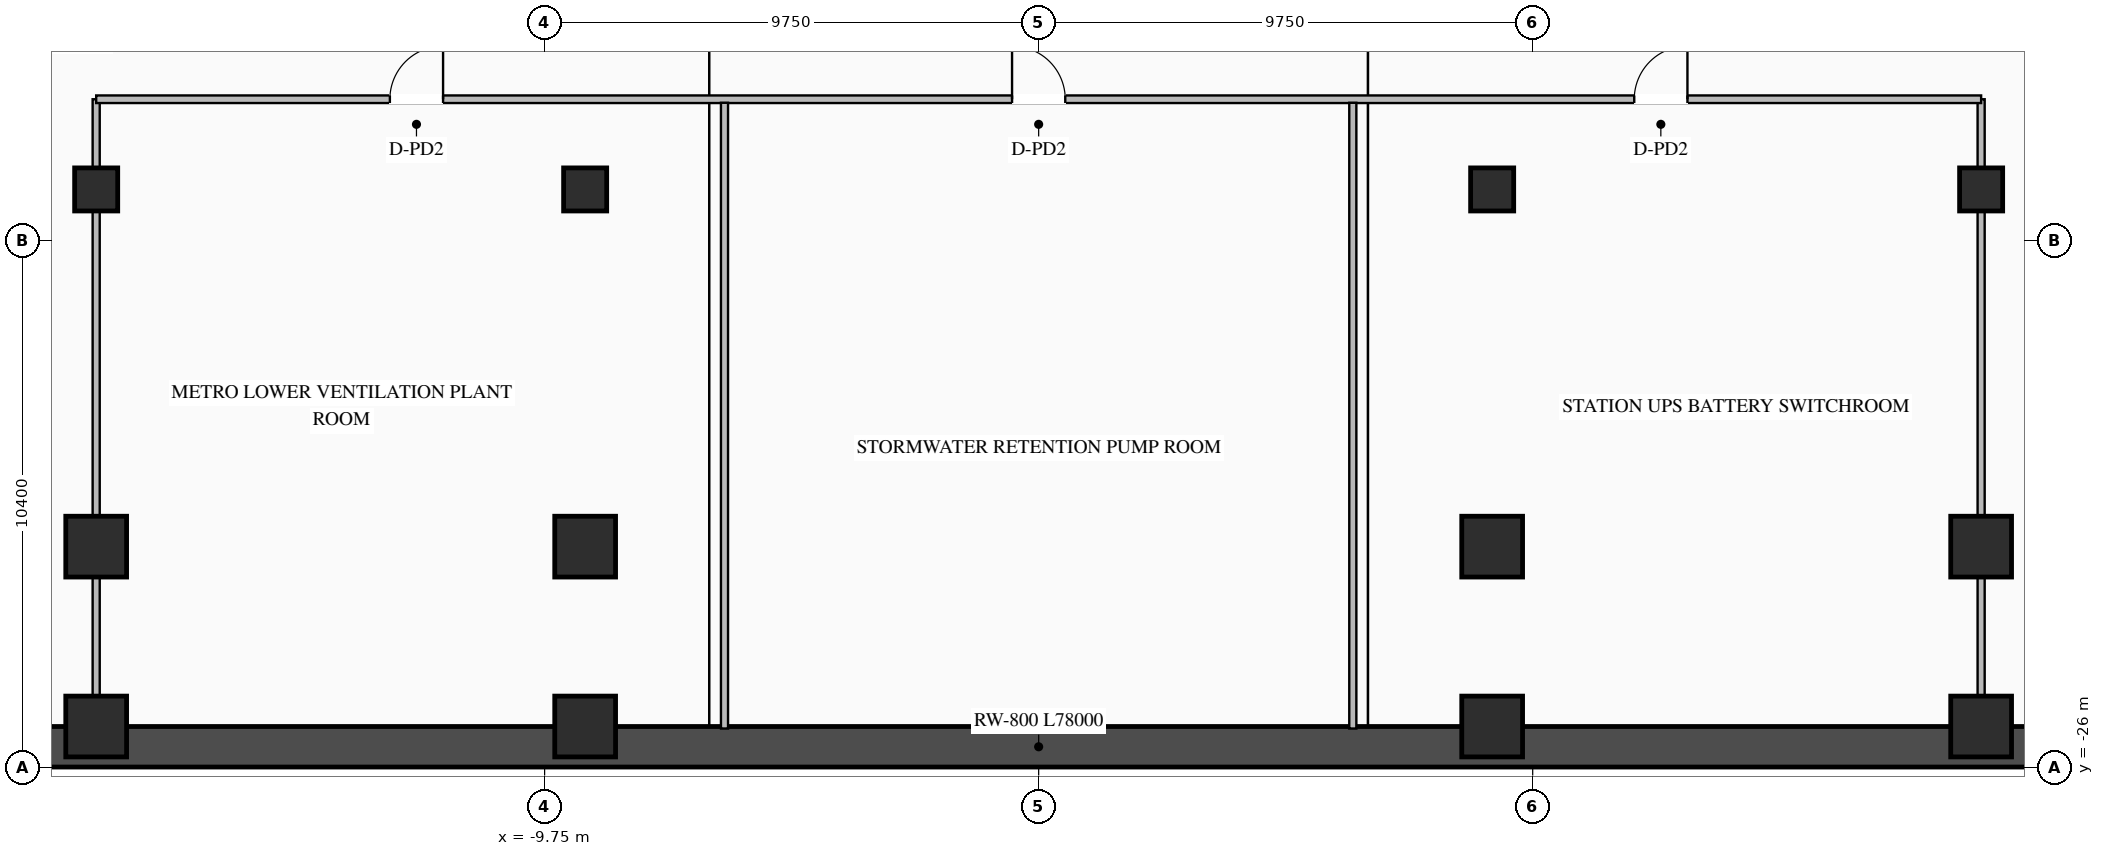
"""IFC4 building model, lengths in metres.
Left out: names, types, materials, properties, quantities, classifications, styles, units other than length and angle.
Written with IfcOpenShell. Run it as: python <this file> out.ifc"""

import sys

from ifc_helpers import new_model, si_unit, direction, frame, frame_2d, origin, origin_2d, place, context, subcontext, project, spatial, rectangle, i_section, extrude, element, fill, save


model = new_model("IFC4")
c1 = context("Model", 3, precision=1e-05, world=origin(), true_north=direction((0.0, 1.0)))
c2 = subcontext(c1, "Body", "Model", "MODEL_VIEW")
j1 = project(units=[si_unit("LENGTHUNIT", "METRE"), si_unit("PLANEANGLEUNIT", "RADIAN")], contexts=[c1])
p1 = place(None, origin())
s1 = spatial("IfcSite", under=j1, at=p1, CompositionType="ELEMENT")
p2 = place(p1, origin())
s2 = spatial("IfcBuilding", under=s1, at=p2, CompositionType="ELEMENT")
p3 = place(p2, frame((0.0, 0.0, -9.6)))
s3 = spatial("IfcBuildingStorey", under=s2, at=p3, CompositionType="ELEMENT", Elevation=-9.6)
p4 = place(p3, frame((-39.0, -25.6, 0.0), z_axis=(0.0, 0.0, 1.0), x_axis=(1.0, 0.0, 0.0)))
e1 = element("IfcWall", 1, at=p4, inside=s3, PredefinedType="SOLIDWALL", context=c2, shape_type="SweptSolid", body=[
    extrude(rectangle(XDim=78.0, YDim=0.8, at=frame_2d((39.0, 0.0))), origin(), (0.0, 0.0, 1.0), 4.5),
])
for number, where, z_axis, x_axis in (
    (2, (-18.6, -14.6, 0.0), (0.0, 0.0, 1.0), (1.0, 0.0, 0.0)),
    (3, (-8.95, -14.6, 0.0), (0.0, 0.0, 1.0), (1.0, 0.0, 0.0)),
    (4, (8.95, -14.6, 0.0), (0.0, 0.0, 1.0), (1.0, 0.0, 0.0)),
    (5, (18.6, -14.6, 0.0), (0.0, 0.0, 1.0), (1.0, 0.0, 0.0)),
):
    element("IfcColumn", number, at=place(p3, frame(where, z_axis=z_axis, x_axis=x_axis)), inside=s3, PredefinedType="COLUMN", context=c2, shape_type="SweptSolid", body=[
        extrude(i_section(OverallWidth=0.85, OverallDepth=0.85, WebThickness=0.032, FlangeThickness=0.048, at=origin_2d()), origin(), (0.0, 0.0, 1.0), 4.8),
    ])
for number, where, z_axis, x_axis in (
    (6, (-18.6, -21.65, 0.0), (0.0, 0.0, 1.0), (1.0, 0.0, 0.0)),
    (7, (-8.95, -21.65, 0.0), (0.0, 0.0, 1.0), (1.0, 0.0, 0.0)),
    (8, (8.95, -21.65, 0.0), (0.0, 0.0, 1.0), (1.0, 0.0, 0.0)),
    (9, (18.6, -21.65, 0.0), (0.0, 0.0, 1.0), (1.0, 0.0, 0.0)),
    (10, (-18.6, -25.2, 0.0), (0.0, 0.0, 1.0), (1.0, 0.0, 0.0)),
    (11, (-8.95, -25.2, 0.0), (0.0, 0.0, 1.0), (1.0, 0.0, 0.0)),
    (12, (8.95, -25.2, 0.0), (0.0, 0.0, 1.0), (1.0, 0.0, 0.0)),
    (13, (18.6, -25.2, 0.0), (0.0, 0.0, 1.0), (1.0, 0.0, 0.0)),
):
    element("IfcColumn", number, at=place(p3, frame(where, z_axis=z_axis, x_axis=x_axis)), inside=s3, PredefinedType="COLUMN", context=c2, shape_type="SweptSolid", body=[
        extrude(rectangle(XDim=1.2, YDim=1.2, at=origin_2d()), origin(), (0.0, 0.0, 1.0), 4.8),
    ])
for number, where, z_axis, x_axis in (
    (14, (-18.6, -25.24, 0.0), (0.0, 0.0, 1.0), (0.0, 1.0, 0.0)),
    (15, (18.6, -25.24, 0.0), (0.0, 0.0, 1.0), (0.0, 1.0, 0.0)),
):
    element("IfcWall", number, at=place(p3, frame(where, z_axis=z_axis, x_axis=x_axis)), inside=s3, PredefinedType="STANDARD", context=c2, shape_type="SweptSolid", body=[
        extrude(rectangle(XDim=12.42, YDim=0.14, at=frame_2d((6.21, 0.0))), origin(), (0.0, 0.0, 1.0), 3.675),
    ])
p5 = place(p3, frame((-18.6, -12.82, 0.0), z_axis=(0.0, 0.0, 1.0), x_axis=(1.0, 0.0, 0.0)))
e16 = element("IfcWall", 16, at=p5, inside=s3, PredefinedType="STANDARD", context=c2, shape_type="SweptSolid", body=[
    extrude(rectangle(XDim=37.2, YDim=0.15, at=frame_2d((18.6, 0.0))), origin(), (0.0, 0.0, 1.0), 4.48),
])
p6 = place(p5, frame((5.796, 0.0, 0.0)))
e17 = element("IfcOpeningElement", 17, at=p6, cuts=e16, PredefinedType="OPENING", context=c2, shape_type="SweptSolid", body=[
    extrude(rectangle(XDim=1.05, YDim=2.08, at=frame_2d((0.525, 1.04))), frame((0.0, 0.085, 0.0), z_axis=(0.0, -1.0, 0.0), x_axis=(1.0, 0.0, 0.0)), (0.0, 0.0, 1.0), 0.17),
])
p7 = place(p5, frame((18.075, 0.0, 0.0)))
e18 = element("IfcOpeningElement", 18, at=p7, cuts=e16, PredefinedType="OPENING", context=c2, shape_type="SweptSolid", body=[
    extrude(rectangle(XDim=1.05, YDim=2.08, at=frame_2d((0.525, 1.04))), frame((0.0, 0.085, 0.0), z_axis=(0.0, -1.0, 0.0), x_axis=(1.0, 0.0, 0.0)), (0.0, 0.0, 1.0), 0.17),
])
p8 = place(p5, frame((30.354, 0.0, 0.0)))
e19 = element("IfcOpeningElement", 19, at=p8, cuts=e16, PredefinedType="OPENING", context=c2, shape_type="SweptSolid", body=[
    extrude(rectangle(XDim=1.05, YDim=2.08, at=frame_2d((0.525, 1.04))), frame((0.0, 0.085, 0.0), z_axis=(0.0, -1.0, 0.0), x_axis=(1.0, 0.0, 0.0)), (0.0, 0.0, 1.0), 0.17),
])
for number, where, z_axis, x_axis in (
    (20, (-6.2, -25.24, 0.0), (0.0, 0.0, 1.0), (0.0, 1.0, 0.0)),
    (21, (6.2, -25.24, 0.0), (0.0, 0.0, 1.0), (0.0, 1.0, 0.0)),
):
    element("IfcWall", number, at=place(p3, frame(where, z_axis=z_axis, x_axis=x_axis)), inside=s3, PredefinedType="STANDARD", context=c2, shape_type="SweptSolid", body=[
        extrude(rectangle(XDim=12.35, YDim=0.14, at=frame_2d((6.175, 0.0))), origin(), (0.0, 0.0, 1.0), 4.48),
    ])
p9 = place(p6, origin())
e22 = element("IfcDoor", 22, at=p9, inside=s3, OperationType="SINGLE_SWING_RIGHT", PredefinedType="DOOR", context=c2, shape_type="SweptSolid", body=[
    extrude(rectangle(XDim=1.05, YDim=2.08, at=frame_2d((0.525, 1.04))), frame((0.0, 0.025, 0.0), z_axis=(0.0, -1.0, 0.0), x_axis=(1.0, 0.0, 0.0)), (0.0, 0.0, 1.0), 0.05),
])
fill(e17, e22)
p10 = place(p7, origin())
e23 = element("IfcDoor", 23, at=p10, inside=s3, OperationType="SINGLE_SWING_LEFT", PredefinedType="DOOR", context=c2, shape_type="SweptSolid", body=[
    extrude(rectangle(XDim=1.05, YDim=2.08, at=frame_2d((0.525, 1.04))), frame((0.0, 0.025, 0.0), z_axis=(0.0, -1.0, 0.0), x_axis=(1.0, 0.0, 0.0)), (0.0, 0.0, 1.0), 0.05),
])
fill(e18, e23)
p11 = place(p8, origin())
e24 = element("IfcDoor", 24, at=p11, inside=s3, OperationType="SINGLE_SWING_RIGHT", PredefinedType="DOOR", context=c2, shape_type="SweptSolid", body=[
    extrude(rectangle(XDim=1.05, YDim=2.08, at=frame_2d((0.525, 1.04))), frame((0.0, 0.025, 0.0), z_axis=(0.0, -1.0, 0.0), x_axis=(1.0, 0.0, 0.0)), (0.0, 0.0, 1.0), 0.05),
])
fill(e19, e24)
save(model, sys.argv[1])
